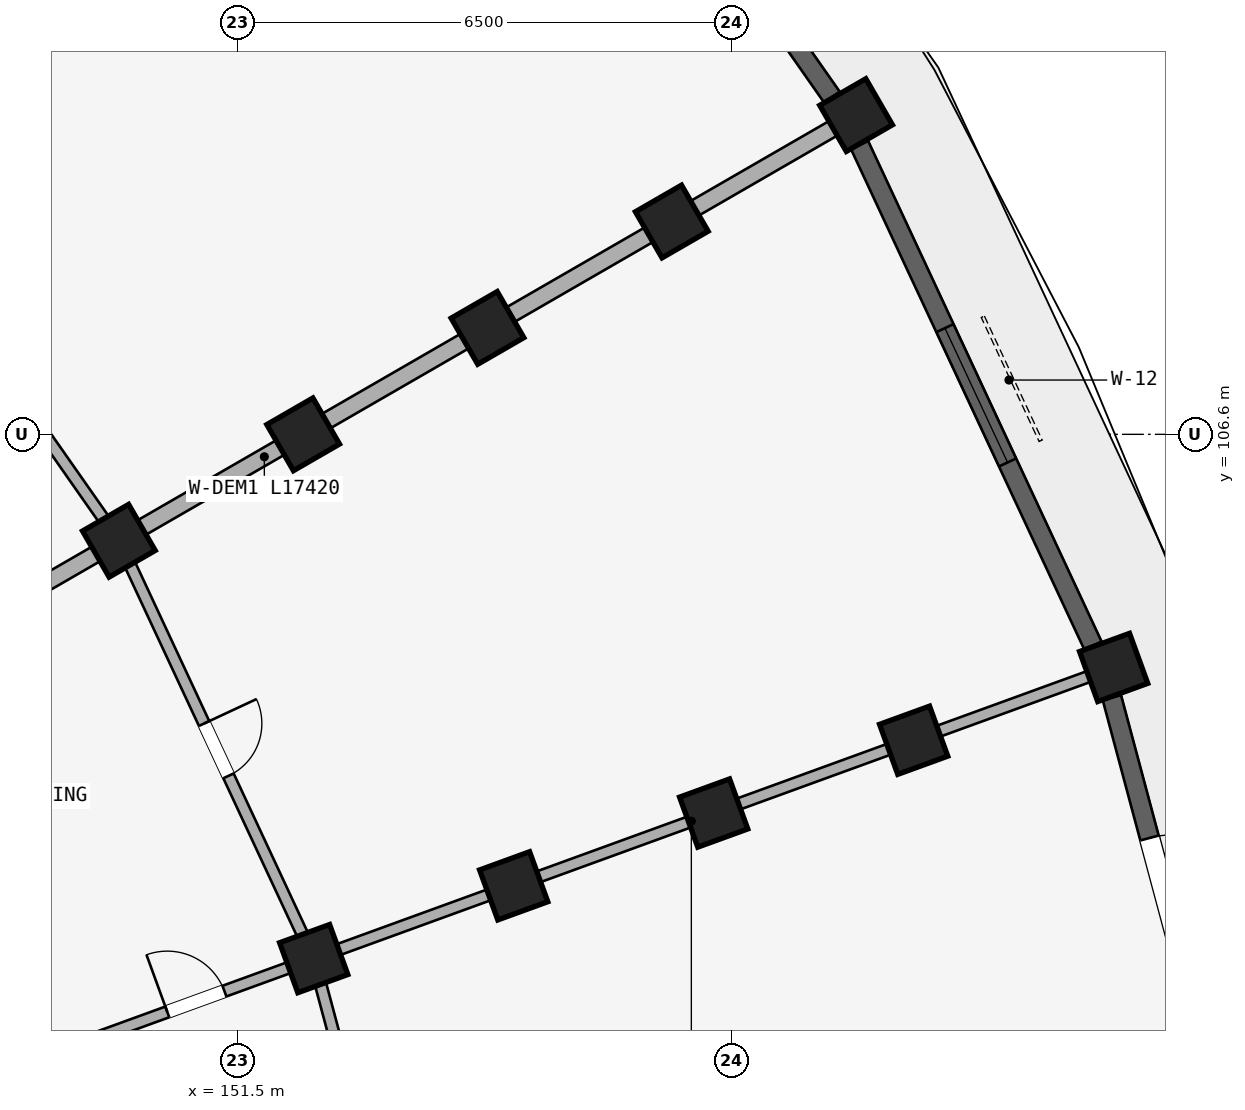
"""IFC4 building model, lengths in metres.
Left out: names, types, materials, properties, quantities, classifications, styles, units other than length and angle.
Written with IfcOpenShell. Run it as: python <this file> out.ifc"""

import sys

from ifc_helpers import new_model, si_unit, direction, frame, frame_2d, origin, origin_2d, place, context, subcontext, project, spatial, rectangle, extrude, element, fill, save


model = new_model("IFC4")
c1 = context("Model", 3, precision=1e-05, world=origin(), true_north=direction((0.0, 1.0)))
c2 = subcontext(c1, "Body", "Model", "MODEL_VIEW")
j1 = project(units=[si_unit("LENGTHUNIT", "METRE"), si_unit("PLANEANGLEUNIT", "RADIAN")], contexts=[c1])
p1 = place(None, origin())
s1 = spatial("IfcSite", under=j1, at=p1, CompositionType="ELEMENT")
p2 = place(p1, origin())
s2 = spatial("IfcBuilding", under=s1, at=p2, CompositionType="ELEMENT")
p3 = place(p2, frame((0.0, 0.0, 18.15)))
s3 = spatial("IfcBuildingStorey", under=s2, at=p3, CompositionType="ELEMENT", Elevation=18.15)
for number, where, z_axis, x_axis in (
    (1, (148.603, 111.969, 0.0), (0.0, 0.0, 1.0), (-0.643, 0.766, 0.0)),
    (2, (149.938, 105.2, 0.0), (0.0, 0.0, 1.0), (-0.5, 0.866, 0.0)),
    (3, (152.363, 106.6, 0.0), (0.0, 0.0, 1.0), (-0.5, 0.866, 0.0)),
    (4, (154.787, 108.0, 0.0), (0.0, 0.0, 1.0), (-0.5, 0.866, 0.0)),
    (5, (157.212, 109.4, 0.0), (0.0, 0.0, 1.0), (-0.5, 0.866, 0.0)),
    (6, (159.637, 110.8, 0.0), (0.0, 0.0, 1.0), (-0.5, 0.866, 0.0)),
    (7, (152.501, 99.702, 0.0), (0.0, 0.0, 1.0), (-0.342, 0.94, 0.0)),
    (8, (155.132, 100.66, 0.0), (0.0, 0.0, 1.0), (-0.342, 0.94, 0.0)),
    (9, (157.764, 101.618, 0.0), (0.0, 0.0, 1.0), (-0.342, 0.94, 0.0)),
    (10, (160.395, 102.575, 0.0), (0.0, 0.0, 1.0), (-0.342, 0.94, 0.0)),
    (11, (163.026, 103.533, 0.0), (0.0, 0.0, 1.0), (-0.342, 0.94, 0.0)),
):
    element("IfcColumn", number, at=place(p3, frame(where, z_axis=z_axis, x_axis=x_axis)), inside=s3, PredefinedType="COLUMN", context=c2, shape_type="SweptSolid", body=[
        extrude(rectangle(XDim=0.7, YDim=0.7, at=origin_2d()), origin(), (0.0, 0.0, 1.0), 2.93),
    ])
p4 = place(p3, frame((137.991, 109.479, 0.0), z_axis=(0.0, 0.0, 1.0), x_axis=(0.642784757967, 0.766046835987, 0.0)))
e12 = element("IfcWall", 12, at=p4, inside=s3, PredefinedType="STANDARD", context=c2, shape_type="SweptSolid", body=[
    extrude(rectangle(XDim=17.42, YDim=0.22, at=frame_2d((8.71, 0.0))), origin(), (0.0, 0.0, 1.0), 2.372),
])
p5 = place(p3, frame((141.479, 105.991, 0.0), z_axis=(0.0, 0.0, 1.0), x_axis=(0.766046835987, 0.642784757967, 0.0)))
e13 = element("IfcWall", 13, at=p5, inside=s3, PredefinedType="PARTITIONING", context=c2, shape_type="SweptSolid", body=[
    extrude(rectangle(XDim=17.42, YDim=0.15, at=frame_2d((8.71, 0.0))), origin(), (0.0, 0.0, 1.0), 2.372),
])
p6 = place(p5, frame((4.45, 0.0, 0.0)))
e14 = element("IfcOpeningElement", 14, at=p6, cuts=e13, PredefinedType="OPENING", context=c2, shape_type="SweptSolid", body=[
    extrude(rectangle(XDim=0.8, YDim=2.1, at=frame_2d((0.4, 1.05))), frame((0.0, 0.085, 0.0), z_axis=(0.0, -1.0, 0.0), x_axis=(1.0, 0.0, 0.0)), (0.0, 0.0, 1.0), 0.17),
])
p7 = place(p3, frame((144.309, 101.95, 0.0), z_axis=(0.0, 0.0, 1.0), x_axis=(0.866026648973, 0.499997843263, 0.0)))
e15 = element("IfcWall", 15, at=p7, inside=s3, PredefinedType="STANDARD", context=c2, shape_type="SweptSolid", body=[
    extrude(rectangle(XDim=17.42, YDim=0.22, at=frame_2d((8.71, 0.0))), origin(), (0.0, 0.0, 1.0), 2.372),
])
p8 = place(p3, frame((146.393, 97.479, 0.0), z_axis=(0.0, 0.0, 1.0), x_axis=(0.939691901159, 0.342022120477, 0.0)))
e16 = element("IfcWall", 16, at=p8, inside=s3, PredefinedType="PARTITIONING", context=c2, shape_type="SweptSolid", body=[
    extrude(rectangle(XDim=17.42, YDim=0.15, at=frame_2d((8.71, 0.0))), origin(), (0.0, 0.0, 1.0), 2.372),
])
p9 = place(p8, frame((4.45, 0.0, 0.0)))
e17 = element("IfcOpeningElement", 17, at=p9, cuts=e16, PredefinedType="OPENING", context=c2, shape_type="SweptSolid", body=[
    extrude(rectangle(XDim=0.8, YDim=2.1, at=frame_2d((0.4, 1.05))), frame((0.0, 0.085, 0.0), z_axis=(0.0, -1.0, 0.0), x_axis=(1.0, 0.0, 0.0)), (0.0, 0.0, 1.0), 0.17),
])
p10 = place(p3, frame((146.458, 110.169, 0.0), z_axis=(0.0, 0.0, 1.0), x_axis=(0.573594691504, -0.81913926159, 0.0)))
e18 = element("IfcWall", 18, at=p10, inside=s3, PredefinedType="PLUMBINGWALL", context=c2, shape_type="SweptSolid", body=[
    extrude(rectangle(XDim=6.066, YDim=0.15, at=frame_2d((3.033, 0.0))), origin(), (0.0, 0.0, 1.0), 2.372),
])
p11 = place(p10, frame((2.613, 0.0, 0.0)))
e19 = element("IfcOpeningElement", 19, at=p11, cuts=e18, PredefinedType="OPENING", context=c2, shape_type="SweptSolid", body=[
    extrude(rectangle(XDim=0.84, YDim=2.1, at=frame_2d((0.42, 1.05))), frame((0.0, 0.085, 0.0), z_axis=(0.0, -1.0, 0.0), x_axis=(1.0, 0.0, 0.0)), (0.0, 0.0, 1.0), 0.17),
])
p12 = place(p3, frame((149.938, 105.2, 0.0), z_axis=(0.0, 0.0, 1.0), x_axis=(0.42260781991, -0.906312656069, 0.0)))
e20 = element("IfcWall", 20, at=p12, inside=s3, PredefinedType="PLUMBINGWALL", context=c2, shape_type="SweptSolid", body=[
    extrude(rectangle(XDim=6.066, YDim=0.15, at=frame_2d((3.033, 0.0))), origin(), (0.0, 0.0, 1.0), 2.372),
])
p13 = place(p12, frame((2.653, 0.0, 0.0)))
e21 = element("IfcOpeningElement", 21, at=p13, cuts=e20, PredefinedType="OPENING", context=c2, shape_type="SweptSolid", body=[
    extrude(rectangle(XDim=0.76, YDim=2.05, at=frame_2d((0.38, 1.025))), frame((0.0, 0.085, 0.0), z_axis=(0.0, -1.0, 0.0), x_axis=(1.0, 0.0, 0.0)), (0.0, 0.0, 1.0), 0.17),
])
p14 = place(p3, frame((152.501, 99.702, 0.0), z_axis=(0.0, 0.0, 1.0), x_axis=(0.258827283048, -0.965923618901, 0.0)))
e22 = element("IfcWall", 22, at=p14, inside=s3, PredefinedType="PLUMBINGWALL", context=c2, shape_type="SweptSolid", body=[
    extrude(rectangle(XDim=6.066, YDim=0.15, at=frame_2d((3.033, 0.0))), origin(), (0.0, 0.0, 1.0), 2.372),
])
p15 = place(p14, frame((2.633, 0.0, 0.0)))
e23 = element("IfcOpeningElement", 23, at=p15, cuts=e22, PredefinedType="OPENING", context=c2, shape_type="SweptSolid", body=[
    extrude(rectangle(XDim=0.8, YDim=2.1, at=frame_2d((0.4, 1.05))), frame((0.0, 0.085, 0.0), z_axis=(0.0, -1.0, 0.0), x_axis=(1.0, 0.0, 0.0)), (0.0, 0.0, 1.0), 0.17),
])
p16 = place(p3, frame((155.151, 116.989, 0.0), z_axis=(0.0, 0.0, 1.0), x_axis=(0.573566061701, -0.819159308599, 0.0)))
e24 = element("IfcWall", 24, at=p16, inside=s3, PredefinedType="STANDARD", context=c2, shape_type="SweptSolid", body=[
    extrude(rectangle(XDim=7.267, YDim=0.25, at=frame_2d((3.633, 0.0))), origin(), (0.0, 0.0, 1.0), 2.372),
])
p17 = place(p16, frame((2.583, 0.0, 0.372)))
e25 = element("IfcOpeningElement", 25, at=p17, cuts=e24, PredefinedType="OPENING", context=c2, shape_type="SweptSolid", body=[
    extrude(rectangle(XDim=2.1, YDim=1.8, at=frame_2d((1.05, 0.9))), frame((0.0, 0.135, 0.0), z_axis=(0.0, -1.0, 0.0), x_axis=(1.0, 0.0, 0.0)), (0.0, 0.0, 1.0), 0.27),
])
p18 = place(p3, frame((159.683, 110.406, 0.0), z_axis=(0.0, 0.0, 1.0), x_axis=(0.422627946127, -0.90630327107, 0.0)))
e26 = element("IfcWall", 26, at=p18, inside=s3, PredefinedType="STANDARD", context=c2, shape_type="SweptSolid", body=[
    extrude(rectangle(XDim=7.267, YDim=0.25, at=frame_2d((3.633, 0.0))), origin(), (0.0, 0.0, 1.0), 2.372),
])
p19 = place(p18, frame((2.658, 0.0, 0.322)))
e27 = element("IfcOpeningElement", 27, at=p19, cuts=e26, PredefinedType="OPENING", context=c2, shape_type="SweptSolid", body=[
    extrude(rectangle(XDim=1.95, YDim=1.85, at=frame_2d((0.975, 0.925))), frame((0.0, 0.135, 0.0), z_axis=(0.0, -1.0, 0.0), x_axis=(1.0, 0.0, 0.0)), (0.0, 0.0, 1.0), 0.27),
])
p20 = place(p3, frame((163.002, 103.137, 0.0), z_axis=(0.0, 0.0, 1.0), x_axis=(0.258802140196, -0.965930355787, 0.0)))
e28 = element("IfcWall", 28, at=p20, inside=s3, PredefinedType="STANDARD", context=c2, shape_type="SweptSolid", body=[
    extrude(rectangle(XDim=7.267, YDim=0.25, at=frame_2d((3.633, 0.0))), origin(), (0.0, 0.0, 1.0), 2.372),
])
p21 = place(p20, frame((4.766, 0.0, 0.522)))
e29 = element("IfcOpeningElement", 29, at=p21, cuts=e28, PredefinedType="OPENING", context=c2, shape_type="SweptSolid", body=[
    extrude(rectangle(XDim=1.2, YDim=1.5, at=frame_2d((0.6, 0.75))), frame((0.0, 0.135, 0.0), z_axis=(0.0, -1.0, 0.0), x_axis=(1.0, 0.0, 0.0)), (0.0, 0.0, 1.0), 0.27),
])
p22 = place(p20, frame((1.913, 0.0, 0.0)))
e30 = element("IfcOpeningElement", 30, at=p22, cuts=e28, PredefinedType="OPENING", context=c2, shape_type="SweptSolid", body=[
    extrude(rectangle(XDim=1.26, YDim=2.15, at=frame_2d((0.63, 1.075))), frame((0.0, 0.135, 0.0), z_axis=(0.0, -1.0, 0.0), x_axis=(1.0, 0.0, 0.0)), (0.0, 0.0, 1.0), 0.27),
])
p23 = place(p19, origin())
e31 = element("IfcWindow", 31, at=p23, inside=s3, PartitioningType="DOUBLE_PANEL_VERTICAL", PredefinedType="WINDOW", context=c2, shape_type="SweptSolid", body=[
    extrude(rectangle(XDim=1.95, YDim=1.85, at=frame_2d((0.975, 0.925))), frame((0.0, 0.03, 0.0), z_axis=(0.0, -1.0, 0.0), x_axis=(1.0, 0.0, 0.0)), (0.0, 0.0, 1.0), 0.06),
])
fill(e27, e31)
p24 = place(p9, frame((0.8, 0.0, 0.0), z_axis=(0.0, 0.0, 1.0), x_axis=(-1.0, 0.0, 0.0)))
e32 = element("IfcDoor", 32, at=p24, inside=s3, OperationType="SINGLE_SWING_RIGHT", PredefinedType="DOOR", context=c2, shape_type="SweptSolid", body=[
    extrude(rectangle(XDim=0.8, YDim=2.1, at=frame_2d((0.4, 1.05))), frame((0.0, 0.025, 0.0), z_axis=(0.0, -1.0, 0.0), x_axis=(1.0, 0.0, 0.0)), (0.0, 0.0, 1.0), 0.05),
])
fill(e17, e32)
p25 = place(p13, origin())
e33 = element("IfcDoor", 33, at=p25, inside=s3, OperationType="SINGLE_SWING_LEFT", PredefinedType="DOOR", context=c2, shape_type="SweptSolid", body=[
    extrude(rectangle(XDim=0.76, YDim=2.05, at=frame_2d((0.38, 1.025))), frame((0.0, 0.025, 0.0), z_axis=(0.0, -1.0, 0.0), x_axis=(1.0, 0.0, 0.0)), (0.0, 0.0, 1.0), 0.05),
])
fill(e21, e33)
p26 = place(p22, origin())
e34 = element("IfcDoor", 34, at=p26, inside=s3, OperationType="SINGLE_SWING_RIGHT", PredefinedType="DOOR", context=c2, shape_type="SweptSolid", body=[
    extrude(rectangle(XDim=1.26, YDim=2.15, at=frame_2d((0.63, 1.075))), frame((0.0, 0.025, 0.0), z_axis=(0.0, -1.0, 0.0), x_axis=(1.0, 0.0, 0.0)), (0.0, 0.0, 1.0), 0.05),
])
fill(e30, e34)
save(model, sys.argv[1])
